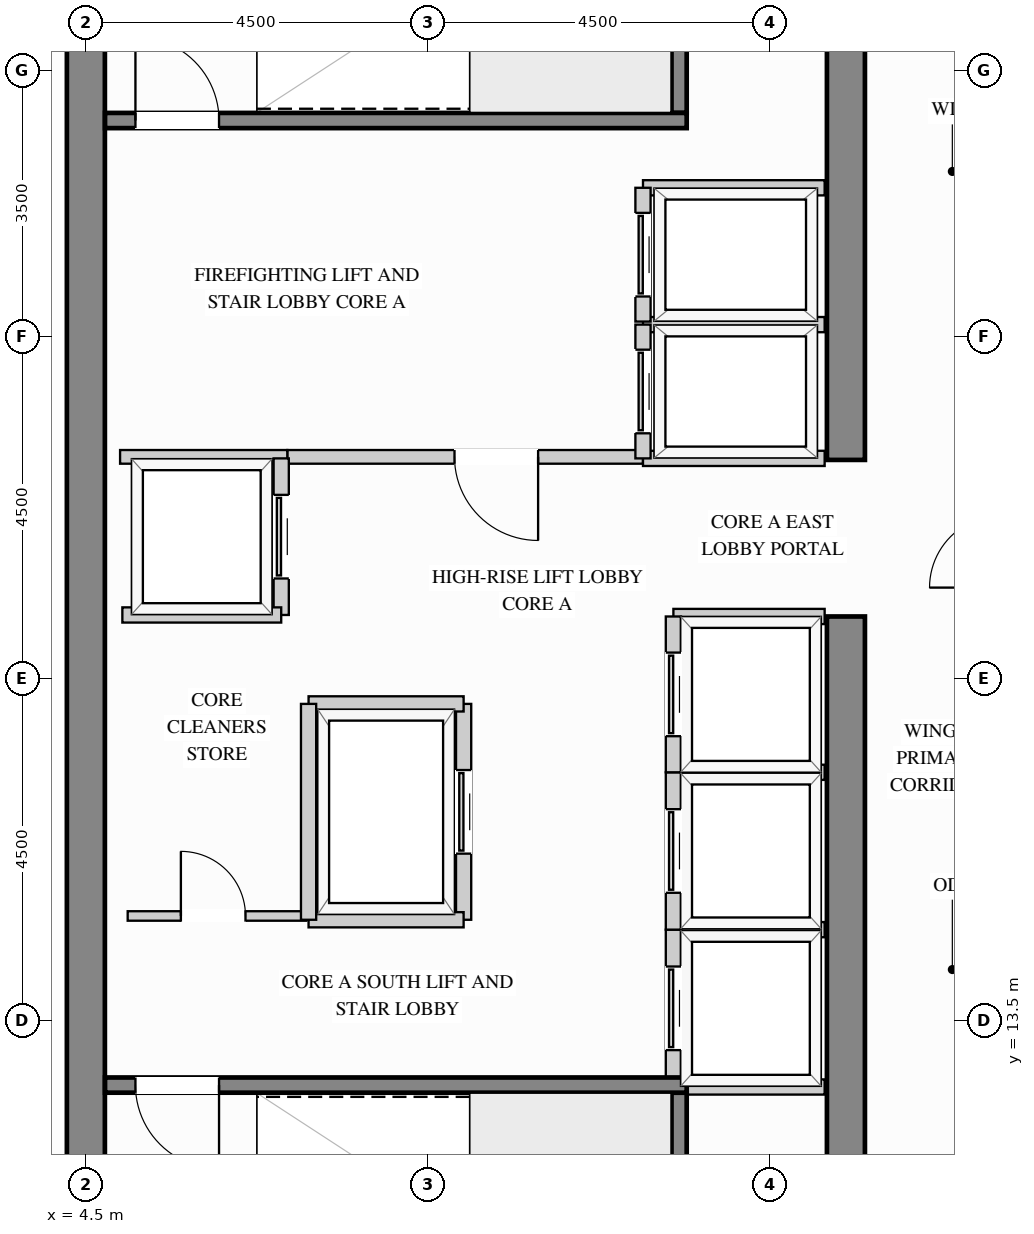
"""IFC4 building model, lengths in metres.
Left out: names, types, materials, properties, quantities, classifications, styles, units other than length and angle.
Written with IfcOpenShell. Run it as: python <this file> out.ifc"""

import sys

from ifc_helpers import new_model, si_unit, direction, frame, frame_2d, origin, place, context, subcontext, project, spatial, rectangle, extrude, source, transform, mapped, element, fill, save


model = new_model("IFC4")
c1 = context("Model", 3, precision=1e-05, world=origin(), true_north=direction((0.0, 1.0)))
c2 = subcontext(c1, "Body", "Model", "MODEL_VIEW")
j1 = project(units=[si_unit("LENGTHUNIT", "METRE"), si_unit("PLANEANGLEUNIT", "RADIAN")], contexts=[c1])
p1 = place(None, origin())
s1 = spatial("IfcSite", under=j1, at=p1, CompositionType="ELEMENT")
p2 = place(p1, origin())
s2 = spatial("IfcBuilding", under=s1, at=p2, CompositionType="ELEMENT")
p3 = place(p2, frame((0.0, 0.0, 255.6)))
s3 = spatial("IfcBuildingStorey", under=s2, at=p3, CompositionType="ELEMENT", Elevation=255.6)
m1 = source(origin(), c2, "Body", "SweptSolid", [
    extrude(rectangle(XDim=10.07, YDim=0.5, at=frame_2d((5.035, 0.0))), origin(), (0.0, 0.0, 1.0), 3.4),
])
p4 = place(p3, frame((14.5, 8.75, 0.0), z_axis=(0.0, 0.0, 1.0), x_axis=(0.0, 1.0, 0.0)))
e1 = element("IfcWall", 1, at=p4, inside=s3, PredefinedType="SHEAR", context=c2, shape_type="MappedRepresentation", body=[
    mapped(m1, transform((0.0, 0.0, 0.0), x_axis=(1.0, 0.0, 0.0), y_axis=(0.0, 1.0, 0.0), z_axis=(0.0, 0.0, 1.0))),
])
m2 = source(origin(), c2, "Body", "SweptSolid", [
    extrude(rectangle(XDim=8.37, YDim=0.5, at=frame_2d((4.185, 0.0))), origin(), (0.0, 0.0, 1.0), 3.4),
])
p5 = place(p3, frame((14.5, 20.88, 0.0), z_axis=(0.0, 0.0, 1.0), x_axis=(0.0, 1.0, 0.0)))
e2 = element("IfcWall", 2, at=p5, inside=s3, PredefinedType="SHEAR", context=c2, shape_type="MappedRepresentation", body=[
    mapped(m2, transform((0.0, 0.0, 0.0), x_axis=(1.0, 0.0, 0.0), y_axis=(0.0, 1.0, 0.0), z_axis=(0.0, 0.0, 1.0))),
])
m3 = source(origin(), c2, "Body", "SweptSolid", [
    extrude(rectangle(XDim=20.5, YDim=0.5, at=frame_2d((10.25, 0.0))), origin(), (0.0, 0.0, 1.0), 3.4),
])
p6 = place(p3, frame((4.5, 8.75, 0.0), z_axis=(0.0, 0.0, 1.0), x_axis=(0.0, 1.0, 0.0)))
e3 = element("IfcWall", 3, at=p6, inside=s3, PredefinedType="SHEAR", context=c2, shape_type="MappedRepresentation", body=[
    mapped(m3, transform((0.0, 0.0, 0.0), x_axis=(1.0, 0.0, 0.0), y_axis=(0.0, 1.0, 0.0), z_axis=(0.0, 0.0, 1.0))),
])
p7 = place(p3, frame((7.15, 20.92, 0.0), z_axis=(0.0, 0.0, 1.0), x_axis=(1.0, 0.0, 0.0)))
e4 = element("IfcWall", 4, at=p7, inside=s3, PredefinedType="PARTITIONING", context=c2, shape_type="SweptSolid", body=[
    extrude(rectangle(XDim=4.68, YDim=0.18, at=frame_2d((2.34, 0.0))), origin(), (0.0, 0.0, 1.0), 3.385),
])
p8 = place(p7, frame((2.2, 0.0, 0.0)))
e5 = element("IfcOpeningElement", 5, at=p8, cuts=e4, PredefinedType="OPENING", context=c2, shape_type="SweptSolid", body=[
    extrude(rectangle(XDim=1.1, YDim=2.15, at=frame_2d((0.55, 1.075))), frame((0.0, 0.1, 0.0), z_axis=(0.0, -1.0, 0.0), x_axis=(1.0, 0.0, 0.0)), (0.0, 0.0, 1.0), 0.2),
])
m4 = source(origin(), c2, "Body", "SweptSolid", [
    extrude(rectangle(XDim=2.2, YDim=0.18, at=frame_2d((1.1, 0.0))), origin(), (0.0, 0.0, 1.0), 3.385),
])
p9 = place(p3, frame((4.95, 20.92, 0.0), z_axis=(0.0, 0.0, 1.0), x_axis=(1.0, 0.0, 0.0)))
e6 = element("IfcWall", 6, at=p9, inside=s3, PredefinedType="PARTITIONING", context=c2, shape_type="MappedRepresentation", body=[
    mapped(m4, transform((0.0, 0.0, 0.0), x_axis=(1.0, 0.0, 0.0), y_axis=(0.0, 1.0, 0.0), z_axis=(0.0, 0.0, 1.0))),
])
p10 = place(p3, frame((5.05, 14.88, 0.0), z_axis=(0.0, 0.0, 1.0), x_axis=(1.0, 0.0, 0.0)))
e7 = element("IfcWall", 7, at=p10, inside=s3, PredefinedType="PARTITIONING", context=c2, shape_type="SweptSolid", body=[
    extrude(rectangle(XDim=2.35, YDim=0.125, at=frame_2d((1.175, 0.0))), origin(), (0.0, 0.0, 1.0), 3.385),
])
p11 = place(p10, frame((0.7, 0.0, 0.0)))
e8 = element("IfcOpeningElement", 8, at=p11, cuts=e7, PredefinedType="OPENING", context=c2, shape_type="SweptSolid", body=[
    extrude(rectangle(XDim=0.85, YDim=2.1, at=frame_2d((0.425, 1.05))), frame((0.0, 0.073, 0.0), z_axis=(0.0, -1.0, 0.0), x_axis=(1.0, 0.0, 0.0)), (0.0, 0.0, 1.0), 0.145),
])
m5 = source(origin(), c2, "Body", "SweptSolid", [
    extrude(rectangle(XDim=2.39, YDim=0.2, at=frame_2d((1.195, 0.0))), origin(), (0.0, 0.0, 1.0), 3.385),
])
for number, where, z_axis, x_axis in (
    (9, (11.83, 22.66, 0.0), (0.0, 0.0, 1.0), (1.0, 0.0, 0.0)),
    (10, (11.83, 20.9, 0.0), (0.0, 0.0, 1.0), (1.0, 0.0, 0.0)),
):
    element("IfcWall", number, at=place(p3, frame(where, z_axis=z_axis, x_axis=x_axis)), inside=s3, PredefinedType="PARTITIONING", context=c2, shape_type="MappedRepresentation", body=[
        mapped(m5, transform((0.0, 0.0, 0.0), x_axis=(1.0, 0.0, 0.0), y_axis=(0.0, 1.0, 0.0), z_axis=(0.0, 0.0, 1.0))),
    ])
p12 = place(p3, frame((11.83, 20.9, 0.0), z_axis=(0.0, 0.0, 1.0), x_axis=(0.0, 1.0, 0.0)))
e11 = element("IfcWall", 11, at=p12, inside=s3, PredefinedType="PARTITIONING", context=c2, shape_type="SweptSolid", body=[
    extrude(rectangle(XDim=1.76, YDim=0.2, at=frame_2d((0.88, 0.0))), origin(), (0.0, 0.0, 1.0), 3.385),
])
p13 = place(p12, frame((0.33, 0.0, 0.0)))
e12 = element("IfcOpeningElement", 12, at=p13, cuts=e11, PredefinedType="OPENING", context=c2, shape_type="SweptSolid", body=[
    extrude(rectangle(XDim=1.1, YDim=2.2, at=frame_2d((0.55, 1.1))), frame((0.0, 0.11, 0.0), z_axis=(0.0, -1.0, 0.0), x_axis=(1.0, 0.0, 0.0)), (0.0, 0.0, 1.0), 0.22),
])
p14 = place(p3, frame((11.83, 24.46, 0.0), z_axis=(0.0, 0.0, 1.0), x_axis=(1.0, 0.0, 0.0)))
e13 = element("IfcWall", 13, at=p14, inside=s3, PredefinedType="PARTITIONING", context=c2, shape_type="MappedRepresentation", body=[
    mapped(m5, transform((0.0, 0.0, 0.0), x_axis=(1.0, 0.0, 0.0), y_axis=(0.0, 1.0, 0.0), z_axis=(0.0, 0.0, 1.0))),
])
p15 = place(p3, frame((11.83, 22.7, 0.0), z_axis=(0.0, 0.0, 1.0), x_axis=(0.0, 1.0, 0.0)))
e14 = element("IfcWall", 14, at=p15, inside=s3, PredefinedType="PARTITIONING", context=c2, shape_type="SweptSolid", body=[
    extrude(rectangle(XDim=1.76, YDim=0.2, at=frame_2d((0.88, 0.0))), origin(), (0.0, 0.0, 1.0), 3.385),
])
p16 = place(p15, frame((0.33, 0.0, 0.0)))
e15 = element("IfcOpeningElement", 15, at=p16, cuts=e14, PredefinedType="OPENING", context=c2, shape_type="SweptSolid", body=[
    extrude(rectangle(XDim=1.1, YDim=2.2, at=frame_2d((0.55, 1.1))), frame((0.0, 0.11, 0.0), z_axis=(0.0, -1.0, 0.0), x_axis=(1.0, 0.0, 0.0)), (0.0, 0.0, 1.0), 0.22),
])
m6 = source(origin(), c2, "Body", "SweptSolid", [
    extrude(rectangle(XDim=1.99, YDim=0.2, at=frame_2d((0.995, 0.0))), origin(), (0.0, 0.0, 1.0), 3.385),
])
for number, where, z_axis, x_axis in (
    (16, (12.23, 14.7, 0.0), (0.0, 0.0, 1.0), (1.0, 0.0, 0.0)),
    (17, (12.23, 12.63, 0.0), (0.0, 0.0, 1.0), (1.0, 0.0, 0.0)),
):
    element("IfcWall", number, at=place(p3, frame(where, z_axis=z_axis, x_axis=x_axis)), inside=s3, PredefinedType="PARTITIONING", context=c2, shape_type="MappedRepresentation", body=[
        mapped(m6, transform((0.0, 0.0, 0.0), x_axis=(1.0, 0.0, 0.0), y_axis=(0.0, 1.0, 0.0), z_axis=(0.0, 0.0, 1.0))),
    ])
p17 = place(p3, frame((12.23, 12.63, 0.0), z_axis=(0.0, 0.0, 1.0), x_axis=(0.0, 1.0, 0.0)))
e18 = element("IfcWall", 18, at=p17, inside=s3, PredefinedType="PARTITIONING", context=c2, shape_type="SweptSolid", body=[
    extrude(rectangle(XDim=2.07, YDim=0.2, at=frame_2d((1.035, 0.0))), origin(), (0.0, 0.0, 1.0), 3.385),
])
p18 = place(p17, frame((0.485, 0.0, 0.0)))
e19 = element("IfcOpeningElement", 19, at=p18, cuts=e18, PredefinedType="OPENING", context=c2, shape_type="SweptSolid", body=[
    extrude(rectangle(XDim=1.1, YDim=2.2, at=frame_2d((0.55, 1.1))), frame((0.0, 0.11, 0.0), z_axis=(0.0, -1.0, 0.0), x_axis=(1.0, 0.0, 0.0)), (0.0, 0.0, 1.0), 0.22),
])
p19 = place(p3, frame((12.23, 16.77, 0.0), z_axis=(0.0, 0.0, 1.0), x_axis=(1.0, 0.0, 0.0)))
e20 = element("IfcWall", 20, at=p19, inside=s3, PredefinedType="PARTITIONING", context=c2, shape_type="MappedRepresentation", body=[
    mapped(m6, transform((0.0, 0.0, 0.0), x_axis=(1.0, 0.0, 0.0), y_axis=(0.0, 1.0, 0.0), z_axis=(0.0, 0.0, 1.0))),
])
p20 = place(p3, frame((12.23, 14.7, 0.0), z_axis=(0.0, 0.0, 1.0), x_axis=(0.0, 1.0, 0.0)))
e21 = element("IfcWall", 21, at=p20, inside=s3, PredefinedType="PARTITIONING", context=c2, shape_type="SweptSolid", body=[
    extrude(rectangle(XDim=2.07, YDim=0.2, at=frame_2d((1.035, 0.0))), origin(), (0.0, 0.0, 1.0), 3.385),
])
p21 = place(p20, frame((0.485, 0.0, 0.0)))
e22 = element("IfcOpeningElement", 22, at=p21, cuts=e21, PredefinedType="OPENING", context=c2, shape_type="SweptSolid", body=[
    extrude(rectangle(XDim=1.1, YDim=2.2, at=frame_2d((0.55, 1.1))), frame((0.0, 0.11, 0.0), z_axis=(0.0, -1.0, 0.0), x_axis=(1.0, 0.0, 0.0)), (0.0, 0.0, 1.0), 0.22),
])
p22 = place(p3, frame((12.23, 18.82, 0.0), z_axis=(0.0, 0.0, 1.0), x_axis=(1.0, 0.0, 0.0)))
e23 = element("IfcWall", 23, at=p22, inside=s3, PredefinedType="PARTITIONING", context=c2, shape_type="MappedRepresentation", body=[
    mapped(m6, transform((0.0, 0.0, 0.0), x_axis=(1.0, 0.0, 0.0), y_axis=(0.0, 1.0, 0.0), z_axis=(0.0, 0.0, 1.0))),
])
p23 = place(p3, frame((12.23, 16.77, 0.0), z_axis=(0.0, 0.0, 1.0), x_axis=(0.0, 1.0, 0.0)))
e24 = element("IfcWall", 24, at=p23, inside=s3, PredefinedType="PARTITIONING", context=c2, shape_type="SweptSolid", body=[
    extrude(rectangle(XDim=2.05, YDim=0.2, at=frame_2d((1.025, 0.0))), origin(), (0.0, 0.0, 1.0), 3.385),
])
p24 = place(p23, frame((0.475, 0.0, 0.0)))
e25 = element("IfcOpeningElement", 25, at=p24, cuts=e24, PredefinedType="OPENING", context=c2, shape_type="SweptSolid", body=[
    extrude(rectangle(XDim=1.1, YDim=2.2, at=frame_2d((0.55, 1.1))), frame((0.0, 0.11, 0.0), z_axis=(0.0, -1.0, 0.0), x_axis=(1.0, 0.0, 0.0)), (0.0, 0.0, 1.0), 0.22),
])
p25 = place(p3, frame((7.07, 18.84, 0.0), z_axis=(0.0, 0.0, 1.0), x_axis=(0.0, 1.0, 0.0)))
e26 = element("IfcWall", 26, at=p25, inside=s3, PredefinedType="PARTITIONING", context=c2, shape_type="SweptSolid", body=[
    extrude(rectangle(XDim=2.06, YDim=0.2, at=frame_2d((1.03, 0.0))), origin(), (0.0, 0.0, 1.0), 3.385),
])
p26 = place(p25, frame((0.48, 0.0, 0.0)))
e27 = element("IfcOpeningElement", 27, at=p26, cuts=e26, PredefinedType="OPENING", context=c2, shape_type="SweptSolid", body=[
    extrude(rectangle(XDim=1.1, YDim=2.2, at=frame_2d((0.55, 1.1))), frame((0.0, 0.11, 0.0), z_axis=(0.0, -1.0, 0.0), x_axis=(1.0, 0.0, 0.0)), (0.0, 0.0, 1.0), 0.22),
])
m7 = source(origin(), c2, "Body", "SweptSolid", [
    extrude(rectangle(XDim=2.09, YDim=0.2, at=frame_2d((1.045, 0.0))), origin(), (0.0, 0.0, 1.0), 3.385),
])
p27 = place(p3, frame((4.98, 18.84, 0.0), z_axis=(0.0, 0.0, 1.0), x_axis=(1.0, 0.0, 0.0)))
e28 = element("IfcWall", 28, at=p27, inside=s3, PredefinedType="PARTITIONING", context=c2, shape_type="MappedRepresentation", body=[
    mapped(m7, transform((0.0, 0.0, 0.0), x_axis=(1.0, 0.0, 0.0), y_axis=(0.0, 1.0, 0.0), z_axis=(0.0, 0.0, 1.0))),
])
p28 = place(p3, frame((9.47, 14.83, 0.0), z_axis=(0.0, 0.0, 1.0), x_axis=(0.0, 1.0, 0.0)))
e29 = element("IfcWall", 29, at=p28, inside=s3, PredefinedType="PARTITIONING", context=c2, shape_type="SweptSolid", body=[
    extrude(rectangle(XDim=2.84, YDim=0.2, at=frame_2d((1.42, 0.0))), origin(), (0.0, 0.0, 1.0), 3.385),
])
p29 = place(p28, frame((0.87, 0.0, 0.0)))
e30 = element("IfcOpeningElement", 30, at=p29, cuts=e29, PredefinedType="OPENING", context=c2, shape_type="SweptSolid", body=[
    extrude(rectangle(XDim=1.1, YDim=2.2, at=frame_2d((0.55, 1.1))), frame((0.0, 0.11, 0.0), z_axis=(0.0, -1.0, 0.0), x_axis=(1.0, 0.0, 0.0)), (0.0, 0.0, 1.0), 0.22),
])
m8 = source(origin(), c2, "Body", "SweptSolid", [
    extrude(rectangle(XDim=2.04, YDim=0.2, at=frame_2d((1.02, 0.0))), origin(), (0.0, 0.0, 1.0), 3.385),
])
for number, where, z_axis, x_axis in (
    (31, (7.43, 17.67, 0.0), (0.0, 0.0, 1.0), (1.0, 0.0, 0.0)),
    (32, (7.43, 14.83, 0.0), (0.0, 0.0, 1.0), (1.0, 0.0, 0.0)),
):
    element("IfcWall", number, at=place(p3, frame(where, z_axis=z_axis, x_axis=x_axis)), inside=s3, PredefinedType="PARTITIONING", context=c2, shape_type="MappedRepresentation", body=[
        mapped(m8, transform((0.0, 0.0, 0.0), x_axis=(1.0, 0.0, 0.0), y_axis=(0.0, 1.0, 0.0), z_axis=(0.0, 0.0, 1.0))),
    ])
m9 = source(origin(), c2, "Body", "SweptSolid", [
    extrude(rectangle(XDim=2.84, YDim=0.2, at=frame_2d((1.42, 0.0))), origin(), (0.0, 0.0, 1.0), 3.385),
])
p30 = place(p3, frame((7.43, 14.83, 0.0), z_axis=(0.0, 0.0, 1.0), x_axis=(0.0, 1.0, 0.0)))
e33 = element("IfcWall", 33, at=p30, inside=s3, PredefinedType="PARTITIONING", context=c2, shape_type="MappedRepresentation", body=[
    mapped(m9, transform((0.0, 0.0, 0.0), x_axis=(1.0, 0.0, 0.0), y_axis=(0.0, 1.0, 0.0), z_axis=(0.0, 0.0, 1.0))),
])
m10 = source(origin(), c2, "Body", "SweptSolid", [
    extrude(rectangle(XDim=3.803, YDim=0.2, at=frame_2d((1.901, 0.0))), origin(), (0.0, 0.0, 1.0), 3.4),
])
p31 = place(p3, frame((12.305, 8.752, 0.0), z_axis=(0.0, 0.0, 1.0), x_axis=(0.0, 1.0, 0.0)))
e34 = element("IfcWall", 34, at=p31, inside=s3, PredefinedType="SHEAR", context=c2, shape_type="MappedRepresentation", body=[
    mapped(m10, transform((0.0, 0.0, 0.0), x_axis=(1.0, 0.0, 0.0), y_axis=(0.0, 1.0, 0.0), z_axis=(0.0, 0.0, 1.0))),
])
p32 = place(p3, frame((4.752, 12.655, 0.0), z_axis=(0.0, 0.0, 1.0), x_axis=(1.0, 0.0, 0.0)))
e35 = element("IfcWall", 35, at=p32, inside=s3, PredefinedType="SHEAR", context=c2, shape_type="SweptSolid", body=[
    extrude(rectangle(XDim=7.653, YDim=0.2, at=frame_2d((3.827, 0.0))), origin(), (0.0, 0.0, 1.0), 3.4),
])
p33 = place(p32, frame((0.4, 0.0, 0.0)))
e36 = element("IfcOpeningElement", 36, at=p33, cuts=e35, PredefinedType="OPENING", context=c2, shape_type="SweptSolid", body=[
    extrude(rectangle(XDim=1.1, YDim=2.15, at=frame_2d((0.55, 1.075))), frame((0.0, 0.11, 0.0), z_axis=(0.0, -1.0, 0.0), x_axis=(1.0, 0.0, 0.0)), (0.0, 0.0, 1.0), 0.22),
])
p34 = place(p3, frame((12.305, 25.445, 0.0), z_axis=(0.0, 0.0, 1.0), x_axis=(0.0, 1.0, 0.0)))
e37 = element("IfcWall", 37, at=p34, inside=s3, PredefinedType="SHEAR", context=c2, shape_type="MappedRepresentation", body=[
    mapped(m10, transform((0.0, 0.0, 0.0), x_axis=(1.0, 0.0, 0.0), y_axis=(0.0, 1.0, 0.0), z_axis=(0.0, 0.0, 1.0))),
])
p35 = place(p3, frame((4.752, 25.345, 0.0), z_axis=(0.0, 0.0, 1.0), x_axis=(1.0, 0.0, 0.0)))
e38 = element("IfcWall", 38, at=p35, inside=s3, PredefinedType="SHEAR", context=c2, shape_type="SweptSolid", body=[
    extrude(rectangle(XDim=7.653, YDim=0.2, at=frame_2d((3.827, 0.0))), origin(), (0.0, 0.0, 1.0), 3.4),
])
p36 = place(p35, frame((0.4, 0.0, 0.0)))
e39 = element("IfcOpeningElement", 39, at=p36, cuts=e38, PredefinedType="OPENING", context=c2, shape_type="SweptSolid", body=[
    extrude(rectangle(XDim=1.1, YDim=2.15, at=frame_2d((0.55, 1.075))), frame((0.0, 0.11, 0.0), z_axis=(0.0, -1.0, 0.0), x_axis=(1.0, 0.0, 0.0)), (0.0, 0.0, 1.0), 0.22),
])
m11 = source(origin(), c2, "Body", "SweptSolid", [
    extrude(rectangle(XDim=1.1, YDim=2.15, at=frame_2d((0.55, 1.075))), frame((0.0, 0.025, 0.0), z_axis=(0.0, -1.0, 0.0), x_axis=(1.0, 0.0, 0.0)), (0.0, 0.0, 1.0), 0.05),
])
p37 = place(p8, origin())
e40 = element("IfcDoor", 40, at=p37, inside=s3, OperationType="SINGLE_SWING_RIGHT", PredefinedType="DOOR", context=c2, shape_type="MappedRepresentation", body=[
    mapped(m11, transform((0.0, 0.0, 0.0), x_axis=(1.0, 0.0, 0.0), y_axis=(0.0, 1.0, 0.0), z_axis=(0.0, 0.0, 1.0))),
])
fill(e5, e40)
m12 = source(origin(), c2, "Body", "SweptSolid", [
    extrude(rectangle(XDim=1.1, YDim=2.2, at=frame_2d((0.55, 1.1))), frame((0.0, 0.025, 0.0), z_axis=(0.0, -1.0, 0.0), x_axis=(1.0, 0.0, 0.0)), (0.0, 0.0, 1.0), 0.05),
])
p38 = place(p13, origin())
e41 = element("IfcDoor", 41, at=p38, inside=s3, OperationType="SLIDING_TO_LEFT", PredefinedType="DOOR", context=c2, shape_type="MappedRepresentation", body=[
    mapped(m12, transform((0.0, 0.0, 0.0), x_axis=(1.0, 0.0, 0.0), y_axis=(0.0, 1.0, 0.0), z_axis=(0.0, 0.0, 1.0))),
])
fill(e12, e41)
p39 = place(p16, origin())
e42 = element("IfcDoor", 42, at=p39, inside=s3, OperationType="SLIDING_TO_LEFT", PredefinedType="DOOR", context=c2, shape_type="MappedRepresentation", body=[
    mapped(m12, transform((0.0, 0.0, 0.0), x_axis=(1.0, 0.0, 0.0), y_axis=(0.0, 1.0, 0.0), z_axis=(0.0, 0.0, 1.0))),
])
fill(e15, e42)
p40 = place(p18, origin())
e43 = element("IfcDoor", 43, at=p40, inside=s3, OperationType="SLIDING_TO_LEFT", PredefinedType="DOOR", context=c2, shape_type="MappedRepresentation", body=[
    mapped(m12, transform((0.0, 0.0, 0.0), x_axis=(1.0, 0.0, 0.0), y_axis=(0.0, 1.0, 0.0), z_axis=(0.0, 0.0, 1.0))),
])
fill(e19, e43)
p41 = place(p21, origin())
e44 = element("IfcDoor", 44, at=p41, inside=s3, OperationType="SLIDING_TO_LEFT", PredefinedType="DOOR", context=c2, shape_type="MappedRepresentation", body=[
    mapped(m12, transform((0.0, 0.0, 0.0), x_axis=(1.0, 0.0, 0.0), y_axis=(0.0, 1.0, 0.0), z_axis=(0.0, 0.0, 1.0))),
])
fill(e22, e44)
p42 = place(p24, origin())
e45 = element("IfcDoor", 45, at=p42, inside=s3, OperationType="SLIDING_TO_LEFT", PredefinedType="DOOR", context=c2, shape_type="MappedRepresentation", body=[
    mapped(m12, transform((0.0, 0.0, 0.0), x_axis=(1.0, 0.0, 0.0), y_axis=(0.0, 1.0, 0.0), z_axis=(0.0, 0.0, 1.0))),
])
fill(e25, e45)
p43 = place(p26, origin())
e46 = element("IfcDoor", 46, at=p43, inside=s3, OperationType="SLIDING_TO_LEFT", PredefinedType="DOOR", context=c2, shape_type="MappedRepresentation", body=[
    mapped(m12, transform((0.0, 0.0, 0.0), x_axis=(1.0, 0.0, 0.0), y_axis=(0.0, 1.0, 0.0), z_axis=(0.0, 0.0, 1.0))),
])
fill(e27, e46)
p44 = place(p29, origin())
e47 = element("IfcDoor", 47, at=p44, inside=s3, OperationType="SLIDING_TO_LEFT", PredefinedType="DOOR", context=c2, shape_type="MappedRepresentation", body=[
    mapped(m12, transform((0.0, 0.0, 0.0), x_axis=(1.0, 0.0, 0.0), y_axis=(0.0, 1.0, 0.0), z_axis=(0.0, 0.0, 1.0))),
])
fill(e30, e47)
m13 = source(origin(), c2, "Body", "SweptSolid", [
    extrude(rectangle(XDim=0.85, YDim=2.1, at=frame_2d((0.425, 1.05))), frame((0.0, 0.025, 0.0), z_axis=(0.0, -1.0, 0.0), x_axis=(1.0, 0.0, 0.0)), (0.0, 0.0, 1.0), 0.05),
])
p45 = place(p11, origin())
e48 = element("IfcDoor", 48, at=p45, inside=s3, OperationType="SINGLE_SWING_LEFT", PredefinedType="DOOR", context=c2, shape_type="MappedRepresentation", body=[
    mapped(m13, transform((0.0, 0.0, 0.0), x_axis=(1.0, 0.0, 0.0), y_axis=(0.0, 1.0, 0.0), z_axis=(0.0, 0.0, 1.0))),
])
fill(e8, e48)
m14 = source(origin(), c2, "Body", "SweptSolid", [
    extrude(rectangle(XDim=1.1, YDim=2.15, at=frame_2d((0.55, 1.075))), frame((0.0, 0.025, 0.0), z_axis=(0.0, -1.0, 0.0), x_axis=(1.0, 0.0, 0.0)), (0.0, 0.0, 1.0), 0.05),
])
p46 = place(p33, origin())
e49 = element("IfcDoor", 49, at=p46, inside=s3, OperationType="SINGLE_SWING_RIGHT", PredefinedType="DOOR", context=c2, shape_type="MappedRepresentation", body=[
    mapped(m14, transform((0.0, 0.0, 0.0), x_axis=(1.0, 0.0, 0.0), y_axis=(0.0, 1.0, 0.0), z_axis=(0.0, 0.0, 1.0))),
])
fill(e36, e49)
p47 = place(p36, origin())
e50 = element("IfcDoor", 50, at=p47, inside=s3, OperationType="SINGLE_SWING_LEFT", PredefinedType="DOOR", context=c2, shape_type="MappedRepresentation", body=[
    mapped(m14, transform((0.0, 0.0, 0.0), x_axis=(1.0, 0.0, 0.0), y_axis=(0.0, 1.0, 0.0), z_axis=(0.0, 0.0, 1.0))),
])
fill(e39, e50)
save(model, sys.argv[1])
